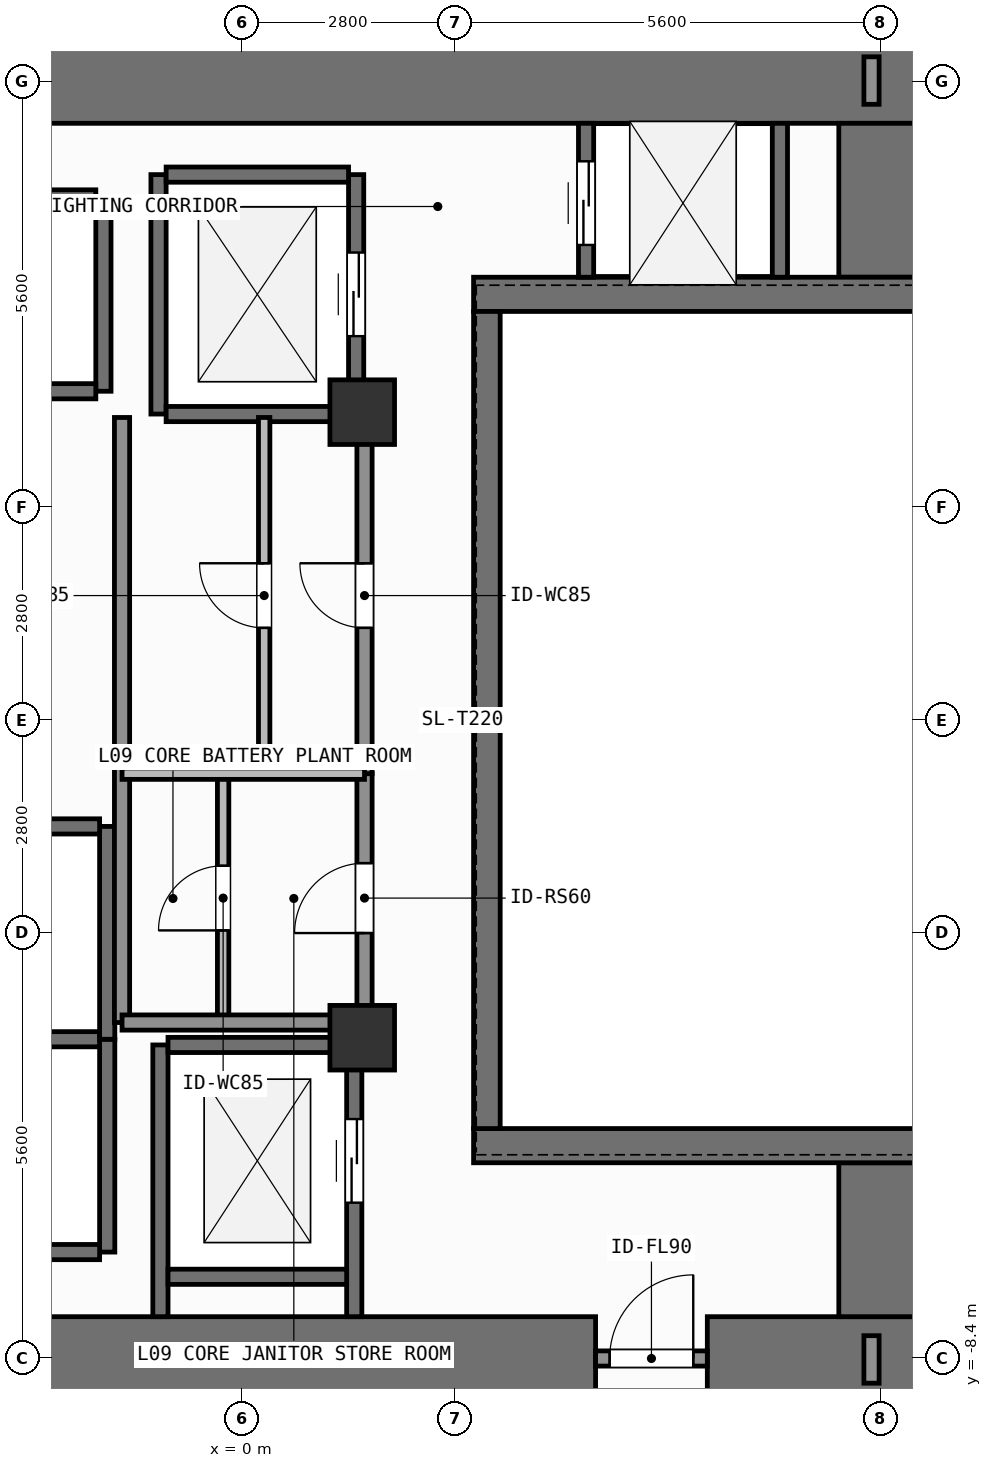
"""IFC4 building model, lengths in metres.
Left out: names, types, materials, properties, quantities, classifications, styles, units other than length and angle.
Written with IfcOpenShell. Run it as: python <this file> out.ifc"""

import sys

from ifc_helpers import new_model, si_unit, direction, frame, frame_2d, origin, origin_2d, place, context, subcontext, project, spatial, rectangle, extrude, element, fill, save


model = new_model("IFC4")
c1 = context("Model", 3, precision=1e-05, world=origin(), true_north=direction((0.0, 1.0)))
c2 = subcontext(c1, "Body", "Model", "MODEL_VIEW")
j1 = project(units=[si_unit("LENGTHUNIT", "METRE"), si_unit("PLANEANGLEUNIT", "RADIAN")], contexts=[c1])
p1 = place(None, origin())
s1 = spatial("IfcSite", under=j1, at=p1, CompositionType="ELEMENT")
p2 = place(p1, origin())
s2 = spatial("IfcBuilding", under=s1, at=p2, CompositionType="ELEMENT")
p3 = place(p2, frame((0.0, 0.0, 34.5)))
s3 = spatial("IfcBuildingStorey", under=s2, at=p3, CompositionType="ELEMENT", Elevation=34.5)
p4 = place(p3, frame((-2.62, -8.4, 0.0), z_axis=(0.0, 0.0, 1.0), x_axis=(1.0, 0.0, 0.0)))
e1 = element("IfcWall", 1, at=p4, inside=s3, PredefinedType="SHEAR", context=c2, shape_type="SweptSolid", body=[
    extrude(rectangle(XDim=7.27, YDim=1.1, at=frame_2d((3.635, 0.0))), origin(), (0.0, 0.0, 1.0), 3.9),
])
p5 = place(p3, frame((6.12, -8.4, 0.0), z_axis=(0.0, 0.0, 1.0), x_axis=(1.0, 0.0, 0.0)))
e2 = element("IfcWall", 2, at=p5, inside=s3, PredefinedType="SHEAR", context=c2, shape_type="SweptSolid", body=[
    extrude(rectangle(XDim=2.83, YDim=1.1, at=frame_2d((1.415, 0.0))), origin(), (0.0, 0.0, 1.0), 3.9),
])
p6 = place(p3, frame((-7.55, 8.4, 0.0), z_axis=(0.0, 0.0, 1.0), x_axis=(1.0, 0.0, 0.0)))
e3 = element("IfcWall", 3, at=p6, inside=s3, PredefinedType="SHEAR", context=c2, shape_type="SweptSolid", body=[
    extrude(rectangle(XDim=16.5, YDim=1.1, at=frame_2d((8.25, 0.0))), origin(), (0.0, 0.0, 1.0), 3.9),
])
for number, where, z_axis, x_axis in (
    (4, (8.4, -7.85, 0.0), (0.0, 0.0, 1.0), (0.0, 1.0, 0.0)),
    (5, (8.4, 5.825, 0.0), (0.0, 0.0, 1.0), (0.0, 1.0, 0.0)),
):
    element("IfcWall", number, at=place(p3, frame(where, z_axis=z_axis, x_axis=x_axis)), inside=s3, PredefinedType="SHEAR", context=c2, shape_type="SweptSolid", body=[
        extrude(rectangle(XDim=2.025, YDim=1.1, at=frame_2d((1.013, 0.0))), origin(), (0.0, 0.0, 1.0), 3.9),
    ])
for number, where, z_axis, x_axis in (
    (6, (3.045, -5.6, 0.0), (0.0, 0.0, 1.0), (1.0, 0.0, 0.0)),
    (7, (3.045, 5.6, 0.0), (0.0, 0.0, 1.0), (1.0, 0.0, 0.0)),
):
    element("IfcWall", number, at=place(p3, frame(where, z_axis=z_axis, x_axis=x_axis)), inside=s3, PredefinedType="SHEAR", context=c2, shape_type="SweptSolid", body=[
        extrude(rectangle(XDim=5.905, YDim=0.45, at=frame_2d((2.953, 0.0))), origin(), (0.0, 0.0, 1.0), 3.9),
    ])
p7 = place(p3, frame((3.22, -5.375, 0.0), z_axis=(0.0, 0.0, 1.0), x_axis=(0.0, 1.0, 0.0)))
e8 = element("IfcWall", 8, at=p7, inside=s3, PredefinedType="SHEAR", context=c2, shape_type="SweptSolid", body=[
    extrude(rectangle(XDim=10.75, YDim=0.35, at=frame_2d((5.375, 0.0))), origin(), (0.0, 0.0, 1.0), 3.9),
])
for number, where, z_axis, x_axis in (
    (9, (1.58, -4.18, 0.0), (0.0, 0.0, 1.0), (1.0, 0.0, 0.0)),
    (10, (1.58, 4.05, 0.0), (0.0, 0.0, 1.0), (1.0, 0.0, 0.0)),
):
    element("IfcColumn", number, at=place(p3, frame(where, z_axis=z_axis, x_axis=x_axis)), inside=s3, PredefinedType="COLUMN", context=c2, shape_type="SweptSolid", body=[
        extrude(rectangle(XDim=0.85, YDim=0.85, at=origin_2d()), origin(), (0.0, 0.0, 1.0), 3.9),
    ])
p8 = place(p3, frame((-1.825, 4.325, 0.0), z_axis=(0.0, 0.0, 1.0), x_axis=(0.0, 1.0, 0.0)))
e11 = element("IfcWall", 11, at=p8, inside=s3, PredefinedType="SHEAR", context=c2, shape_type="SweptSolid", body=[
    extrude(rectangle(XDim=2.55, YDim=0.2, at=frame_2d((1.275, 0.0))), origin(), (0.0, 0.0, 1.0), 3.68),
])
for number, where, z_axis, x_axis in (
    (12, (-4.275, 4.325, 0.0), (0.0, 0.0, 1.0), (1.0, 0.0, 0.0)),
    (13, (-4.275, 6.875, 0.0), (0.0, 0.0, 1.0), (1.0, 0.0, 0.0)),
):
    element("IfcWall", number, at=place(p3, frame(where, z_axis=z_axis, x_axis=x_axis)), inside=s3, PredefinedType="SHEAR", context=c2, shape_type="SweptSolid", body=[
        extrude(rectangle(XDim=2.35, YDim=0.2, at=frame_2d((1.175, 0.0))), origin(), (0.0, 0.0, 1.0), 3.68),
    ])
p9 = place(p3, frame((-1.775, -7.0, 0.0), z_axis=(0.0, 0.0, 1.0), x_axis=(0.0, 1.0, 0.0)))
e14 = element("IfcWall", 14, at=p9, inside=s3, PredefinedType="SHEAR", context=c2, shape_type="SweptSolid", body=[
    extrude(rectangle(XDim=2.8, YDim=0.2, at=frame_2d((1.4, 0.0))), origin(), (0.0, 0.0, 1.0), 3.68),
])
for number, where, z_axis, x_axis in (
    (15, (-4.325, -7.0, 0.0), (0.0, 0.0, 1.0), (1.0, 0.0, 0.0)),
    (16, (-4.325, -4.2, 0.0), (0.0, 0.0, 1.0), (1.0, 0.0, 0.0)),
):
    element("IfcWall", number, at=place(p3, frame(where, z_axis=z_axis, x_axis=x_axis)), inside=s3, PredefinedType="SHEAR", context=c2, shape_type="SweptSolid", body=[
        extrude(rectangle(XDim=2.45, YDim=0.2, at=frame_2d((1.225, 0.0))), origin(), (0.0, 0.0, 1.0), 3.68),
    ])
p10 = place(p3, frame((-1.775, -4.2, 0.0), z_axis=(0.0, 0.0, 1.0), x_axis=(0.0, 1.0, 0.0)))
e17 = element("IfcWall", 17, at=p10, inside=s3, PredefinedType="SHEAR", context=c2, shape_type="SweptSolid", body=[
    extrude(rectangle(XDim=2.8, YDim=0.2, at=frame_2d((1.4, 0.0))), origin(), (0.0, 0.0, 1.0), 3.68),
])
p11 = place(p3, frame((-4.325, -1.4, 0.0), z_axis=(0.0, 0.0, 1.0), x_axis=(1.0, 0.0, 0.0)))
e18 = element("IfcWall", 18, at=p11, inside=s3, PredefinedType="SHEAR", context=c2, shape_type="SweptSolid", body=[
    extrude(rectangle(XDim=2.45, YDim=0.2, at=frame_2d((1.225, 0.0))), origin(), (0.0, 0.0, 1.0), 3.68),
])
p12 = place(p3, frame((-1.1, 4.025, 0.0), z_axis=(0.0, 0.0, 1.0), x_axis=(0.0, 1.0, 0.0)))
e19 = element("IfcWall", 19, at=p12, inside=s3, PredefinedType="SHEAR", context=c2, shape_type="SweptSolid", body=[
    extrude(rectangle(XDim=3.15, YDim=0.2, at=frame_2d((1.575, 0.0))), origin(), (0.0, 0.0, 1.0), 3.68),
])
p13 = place(p3, frame((1.5, 4.025, 0.0), z_axis=(0.0, 0.0, 1.0), x_axis=(0.0, 1.0, 0.0)))
e20 = element("IfcWall", 20, at=p13, inside=s3, PredefinedType="SHEAR", context=c2, shape_type="SweptSolid", body=[
    extrude(rectangle(XDim=3.15, YDim=0.2, at=frame_2d((1.575, 0.0))), origin(), (0.0, 0.0, 1.0), 3.68),
])
p14 = place(p13, frame((1.025, 0.0, 0.0)))
e21 = element("IfcOpeningElement", 21, at=p14, cuts=e20, PredefinedType="OPENING", context=c2, shape_type="SweptSolid", body=[
    extrude(rectangle(XDim=1.1, YDim=2.2, at=frame_2d((0.55, 1.1))), frame((0.0, 0.11, 0.0), z_axis=(0.0, -1.0, 0.0), x_axis=(1.0, 0.0, 0.0)), (0.0, 0.0, 1.0), 0.22),
])
for number, where, z_axis, x_axis in (
    (22, (-1.0, 4.025, 0.0), (0.0, 0.0, 1.0), (1.0, 0.0, 0.0)),
    (23, (-1.0, 7.175, 0.0), (0.0, 0.0, 1.0), (1.0, 0.0, 0.0)),
):
    element("IfcWall", number, at=place(p3, frame(where, z_axis=z_axis, x_axis=x_axis)), inside=s3, PredefinedType="SHEAR", context=c2, shape_type="SweptSolid", body=[
        extrude(rectangle(XDim=2.4, YDim=0.2, at=frame_2d((1.2, 0.0))), origin(), (0.0, 0.0, 1.0), 3.68),
    ])
p15 = place(p3, frame((-1.075, -7.85, 0.0), z_axis=(0.0, 0.0, 1.0), x_axis=(0.0, 1.0, 0.0)))
e24 = element("IfcWall", 24, at=p15, inside=s3, PredefinedType="SHEAR", context=c2, shape_type="SweptSolid", body=[
    extrude(rectangle(XDim=3.575, YDim=0.2, at=frame_2d((1.788, 0.0))), origin(), (0.0, 0.0, 1.0), 3.68),
])
p16 = place(p3, frame((1.475, -7.85, 0.0), z_axis=(0.0, 0.0, 1.0), x_axis=(0.0, 1.0, 0.0)))
e25 = element("IfcWall", 25, at=p16, inside=s3, PredefinedType="SHEAR", context=c2, shape_type="SweptSolid", body=[
    extrude(rectangle(XDim=3.575, YDim=0.2, at=frame_2d((1.788, 0.0))), origin(), (0.0, 0.0, 1.0), 3.68),
])
p17 = place(p16, frame((1.5, 0.0, 0.0)))
e26 = element("IfcOpeningElement", 26, at=p17, cuts=e25, PredefinedType="OPENING", context=c2, shape_type="SweptSolid", body=[
    extrude(rectangle(XDim=1.1, YDim=2.2, at=frame_2d((0.55, 1.1))), frame((0.0, 0.11, 0.0), z_axis=(0.0, -1.0, 0.0), x_axis=(1.0, 0.0, 0.0)), (0.0, 0.0, 1.0), 0.22),
])
for number, where, z_axis, x_axis in (
    (27, (-0.975, -7.325, 0.0), (0.0, 0.0, 1.0), (1.0, 0.0, 0.0)),
    (28, (-0.975, -4.275, 0.0), (0.0, 0.0, 1.0), (1.0, 0.0, 0.0)),
):
    element("IfcWall", number, at=place(p3, frame(where, z_axis=z_axis, x_axis=x_axis)), inside=s3, PredefinedType="SHEAR", context=c2, shape_type="SweptSolid", body=[
        extrude(rectangle(XDim=2.35, YDim=0.2, at=frame_2d((1.175, 0.0))), origin(), (0.0, 0.0, 1.0), 3.68),
    ])
p18 = place(p3, frame((4.525, 5.825, 0.0), z_axis=(0.0, 0.0, 1.0), x_axis=(0.0, 1.0, 0.0)))
e29 = element("IfcWall", 29, at=p18, inside=s3, PredefinedType="SHEAR", context=c2, shape_type="SweptSolid", body=[
    extrude(rectangle(XDim=2.025, YDim=0.2, at=frame_2d((1.013, 0.0))), origin(), (0.0, 0.0, 1.0), 3.68),
])
p19 = place(p18, frame((0.425, 0.0, 0.0)))
e30 = element("IfcOpeningElement", 30, at=p19, cuts=e29, PredefinedType="OPENING", context=c2, shape_type="SweptSolid", body=[
    extrude(rectangle(XDim=1.1, YDim=2.2, at=frame_2d((0.55, 1.1))), frame((0.0, 0.11, 0.0), z_axis=(0.0, -1.0, 0.0), x_axis=(1.0, 0.0, 0.0)), (0.0, 0.0, 1.0), 0.22),
])
p20 = place(p3, frame((7.075, 5.825, 0.0), z_axis=(0.0, 0.0, 1.0), x_axis=(0.0, 1.0, 0.0)))
e31 = element("IfcWall", 31, at=p20, inside=s3, PredefinedType="SHEAR", context=c2, shape_type="SweptSolid", body=[
    extrude(rectangle(XDim=2.025, YDim=0.2, at=frame_2d((1.013, 0.0))), origin(), (0.0, 0.0, 1.0), 3.68),
])
p21 = place(p3, frame((4.65, -8.4, 0.0), z_axis=(0.0, 0.0, 1.0), x_axis=(1.0, 0.0, 0.0)))
e32 = element("IfcWall", 32, at=p21, inside=s3, PredefinedType="SOLIDWALL", context=c2, shape_type="SweptSolid", body=[
    extrude(rectangle(XDim=1.47, YDim=0.2, at=frame_2d((0.735, 0.0))), origin(), (0.0, 0.0, 1.0), 2.72),
])
p22 = place(p21, frame((0.185, 0.0, 0.0)))
e33 = element("IfcOpeningElement", 33, at=p22, cuts=e32, PredefinedType="OPENING", context=c2, shape_type="SweptSolid", body=[
    extrude(rectangle(XDim=1.1, YDim=2.15, at=frame_2d((0.55, 1.075))), frame((0.0, 0.11, 0.0), z_axis=(0.0, -1.0, 0.0), x_axis=(1.0, 0.0, 0.0)), (0.0, 0.0, 1.0), 0.22),
])
p23 = place(p3, frame((-0.25, -3.98, 0.0), z_axis=(0.0, 0.0, 1.0), x_axis=(0.0, 1.0, 0.0)))
e34 = element("IfcWall", 34, at=p23, inside=s3, PredefinedType="PARTITIONING", context=c2, shape_type="SweptSolid", body=[
    extrude(rectangle(XDim=3.274, YDim=0.15, at=frame_2d((1.637, 0.0))), origin(), (0.0, 0.0, 1.0), 3.68),
])
p24 = place(p23, frame((1.212, 0.0, 0.0)))
e35 = element("IfcOpeningElement", 35, at=p24, cuts=e34, PredefinedType="OPENING", context=c2, shape_type="SweptSolid", body=[
    extrude(rectangle(XDim=0.85, YDim=2.1, at=frame_2d((0.425, 1.05))), frame((0.0, 0.085, 0.0), z_axis=(0.0, -1.0, 0.0), x_axis=(1.0, 0.0, 0.0)), (0.0, 0.0, 1.0), 0.17),
])
p25 = place(p3, frame((0.29, -0.706, 0.0), z_axis=(0.0, 0.0, 1.0), x_axis=(0.0, 1.0, 0.0)))
e36 = element("IfcWall", 36, at=p25, inside=s3, PredefinedType="PARTITIONING", context=c2, shape_type="SweptSolid", body=[
    extrude(rectangle(XDim=4.686, YDim=0.15, at=frame_2d((2.343, 0.0))), origin(), (0.0, 0.0, 1.0), 3.68),
])
p26 = place(p25, frame((1.918, 0.0, 0.0)))
e37 = element("IfcOpeningElement", 37, at=p26, cuts=e36, PredefinedType="OPENING", context=c2, shape_type="SweptSolid", body=[
    extrude(rectangle(XDim=0.85, YDim=2.1, at=frame_2d((0.425, 1.05))), frame((0.0, 0.085, 0.0), z_axis=(0.0, -1.0, 0.0), x_axis=(1.0, 0.0, 0.0)), (0.0, 0.0, 1.0), 0.17),
])
p27 = place(p3, frame((1.61, -3.98, 0.0), z_axis=(0.0, 0.0, 1.0), x_axis=(0.0, 1.0, 0.0)))
e38 = element("IfcWall", 38, at=p27, inside=s3, PredefinedType="SOLIDWALL", context=c2, shape_type="SweptSolid", body=[
    extrude(rectangle(XDim=3.274, YDim=0.2, at=frame_2d((1.637, 0.0))), origin(), (0.0, 0.0, 1.0), 3.68),
])
p28 = place(p27, frame((1.177, 0.0, 0.0)))
e39 = element("IfcOpeningElement", 39, at=p28, cuts=e38, PredefinedType="OPENING", context=c2, shape_type="SweptSolid", body=[
    extrude(rectangle(XDim=0.92, YDim=2.1, at=frame_2d((0.46, 1.05))), frame((0.0, 0.11, 0.0), z_axis=(0.0, -1.0, 0.0), x_axis=(1.0, 0.0, 0.0)), (0.0, 0.0, 1.0), 0.22),
])
p29 = place(p3, frame((1.61, -0.706, 0.0), z_axis=(0.0, 0.0, 1.0), x_axis=(0.0, 1.0, 0.0)))
e40 = element("IfcWall", 40, at=p29, inside=s3, PredefinedType="SOLIDWALL", context=c2, shape_type="SweptSolid", body=[
    extrude(rectangle(XDim=4.686, YDim=0.2, at=frame_2d((2.343, 0.0))), origin(), (0.0, 0.0, 1.0), 3.68),
])
p30 = place(p29, frame((1.918, 0.0, 0.0)))
e41 = element("IfcOpeningElement", 41, at=p30, cuts=e40, PredefinedType="OPENING", context=c2, shape_type="SweptSolid", body=[
    extrude(rectangle(XDim=0.85, YDim=2.1, at=frame_2d((0.425, 1.05))), frame((0.0, 0.11, 0.0), z_axis=(0.0, -1.0, 0.0), x_axis=(1.0, 0.0, 0.0)), (0.0, 0.0, 1.0), 0.22),
])
p31 = place(p3, frame((-1.58, -3.98, 0.0), z_axis=(0.0, 0.0, 1.0), x_axis=(0.0, 1.0, 0.0)))
e42 = element("IfcWall", 42, at=p31, inside=s3, PredefinedType="SOLIDWALL", context=c2, shape_type="SweptSolid", body=[
    extrude(rectangle(XDim=7.96, YDim=0.2, at=frame_2d((3.98, 0.0))), origin(), (0.0, 0.0, 1.0), 3.68),
])
p32 = place(p3, frame((-1.58, -3.98, 0.0), z_axis=(0.0, 0.0, 1.0), x_axis=(1.0, 0.0, 0.0)))
e43 = element("IfcWall", 43, at=p32, inside=s3, PredefinedType="SOLIDWALL", context=c2, shape_type="SweptSolid", body=[
    extrude(rectangle(XDim=3.19, YDim=0.2, at=frame_2d((1.595, 0.0))), origin(), (0.0, 0.0, 1.0), 3.68),
])
p33 = place(p3, frame((-1.58, -0.706, 0.0), z_axis=(0.0, 0.0, 1.0), x_axis=(1.0, 0.0, 0.0)))
e44 = element("IfcWall", 44, at=p33, inside=s3, PredefinedType="PARTITIONING", context=c2, shape_type="SweptSolid", body=[
    extrude(rectangle(XDim=3.19, YDim=0.15, at=frame_2d((1.595, 0.0))), origin(), (0.0, 0.0, 1.0), 3.68),
])
for number, where, z_axis, x_axis in (
    (45, (8.28, -8.725, 0.0), (0.0, 0.0, 1.0), (0.0, 1.0, 0.0)),
    (46, (8.28, 8.1, 0.0), (0.0, 0.0, 1.0), (0.0, 1.0, 0.0)),
):
    element("IfcWall", number, at=place(p3, frame(where, z_axis=z_axis, x_axis=x_axis)), inside=s3, PredefinedType="SOLIDWALL", context=c2, shape_type="SweptSolid", body=[
        extrude(rectangle(XDim=0.625, YDim=0.2, at=frame_2d((0.312, 0.0))), origin(), (0.0, 0.0, 1.0), 3.68),
    ])
p34 = place(p14, origin())
e47 = element("IfcDoor", 47, at=p34, inside=s3, OperationType="SLIDING_TO_LEFT", PredefinedType="DOOR", context=c2, shape_type="SweptSolid", body=[
    extrude(rectangle(XDim=1.1, YDim=2.2, at=frame_2d((0.55, 1.1))), frame((0.0, 0.025, 0.0), z_axis=(0.0, -1.0, 0.0), x_axis=(1.0, 0.0, 0.0)), (0.0, 0.0, 1.0), 0.05),
])
fill(e21, e47)
p35 = place(p17, origin())
e48 = element("IfcDoor", 48, at=p35, inside=s3, OperationType="SLIDING_TO_LEFT", PredefinedType="DOOR", context=c2, shape_type="SweptSolid", body=[
    extrude(rectangle(XDim=1.1, YDim=2.2, at=frame_2d((0.55, 1.1))), frame((0.0, 0.025, 0.0), z_axis=(0.0, -1.0, 0.0), x_axis=(1.0, 0.0, 0.0)), (0.0, 0.0, 1.0), 0.05),
])
fill(e26, e48)
p36 = place(p19, origin())
e49 = element("IfcDoor", 49, at=p36, inside=s3, OperationType="SLIDING_TO_LEFT", PredefinedType="DOOR", context=c2, shape_type="SweptSolid", body=[
    extrude(rectangle(XDim=1.1, YDim=2.2, at=frame_2d((0.55, 1.1))), frame((0.0, 0.025, 0.0), z_axis=(0.0, -1.0, 0.0), x_axis=(1.0, 0.0, 0.0)), (0.0, 0.0, 1.0), 0.05),
])
fill(e30, e49)
p37 = place(p22, origin())
e50 = element("IfcDoor", 50, at=p37, inside=s3, OperationType="SINGLE_SWING_RIGHT", PredefinedType="DOOR", context=c2, shape_type="SweptSolid", body=[
    extrude(rectangle(XDim=1.1, YDim=2.15, at=frame_2d((0.55, 1.075))), frame((0.0, 0.025, 0.0), z_axis=(0.0, -1.0, 0.0), x_axis=(1.0, 0.0, 0.0)), (0.0, 0.0, 1.0), 0.05),
])
fill(e33, e50)
p38 = place(p24, origin())
e51 = element("IfcDoor", 51, at=p38, inside=s3, OperationType="SINGLE_SWING_LEFT", PredefinedType="DOOR", context=c2, shape_type="SweptSolid", body=[
    extrude(rectangle(XDim=0.85, YDim=2.1, at=frame_2d((0.425, 1.05))), frame((0.0, 0.025, 0.0), z_axis=(0.0, -1.0, 0.0), x_axis=(1.0, 0.0, 0.0)), (0.0, 0.0, 1.0), 0.05),
])
fill(e35, e51)
p39 = place(p26, origin())
e52 = element("IfcDoor", 52, at=p39, inside=s3, OperationType="SINGLE_SWING_RIGHT", PredefinedType="DOOR", context=c2, shape_type="SweptSolid", body=[
    extrude(rectangle(XDim=0.85, YDim=2.1, at=frame_2d((0.425, 1.05))), frame((0.0, 0.025, 0.0), z_axis=(0.0, -1.0, 0.0), x_axis=(1.0, 0.0, 0.0)), (0.0, 0.0, 1.0), 0.05),
])
fill(e37, e52)
p40 = place(p28, origin())
e53 = element("IfcDoor", 53, at=p40, inside=s3, OperationType="SINGLE_SWING_LEFT", PredefinedType="DOOR", context=c2, shape_type="SweptSolid", body=[
    extrude(rectangle(XDim=0.92, YDim=2.1, at=frame_2d((0.46, 1.05))), frame((0.0, 0.025, 0.0), z_axis=(0.0, -1.0, 0.0), x_axis=(1.0, 0.0, 0.0)), (0.0, 0.0, 1.0), 0.05),
])
fill(e39, e53)
p41 = place(p30, origin())
e54 = element("IfcDoor", 54, at=p41, inside=s3, OperationType="SINGLE_SWING_RIGHT", PredefinedType="DOOR", context=c2, shape_type="SweptSolid", body=[
    extrude(rectangle(XDim=0.85, YDim=2.1, at=frame_2d((0.425, 1.05))), frame((0.0, 0.025, 0.0), z_axis=(0.0, -1.0, 0.0), x_axis=(1.0, 0.0, 0.0)), (0.0, 0.0, 1.0), 0.05),
])
fill(e41, e54)
save(model, sys.argv[1])
